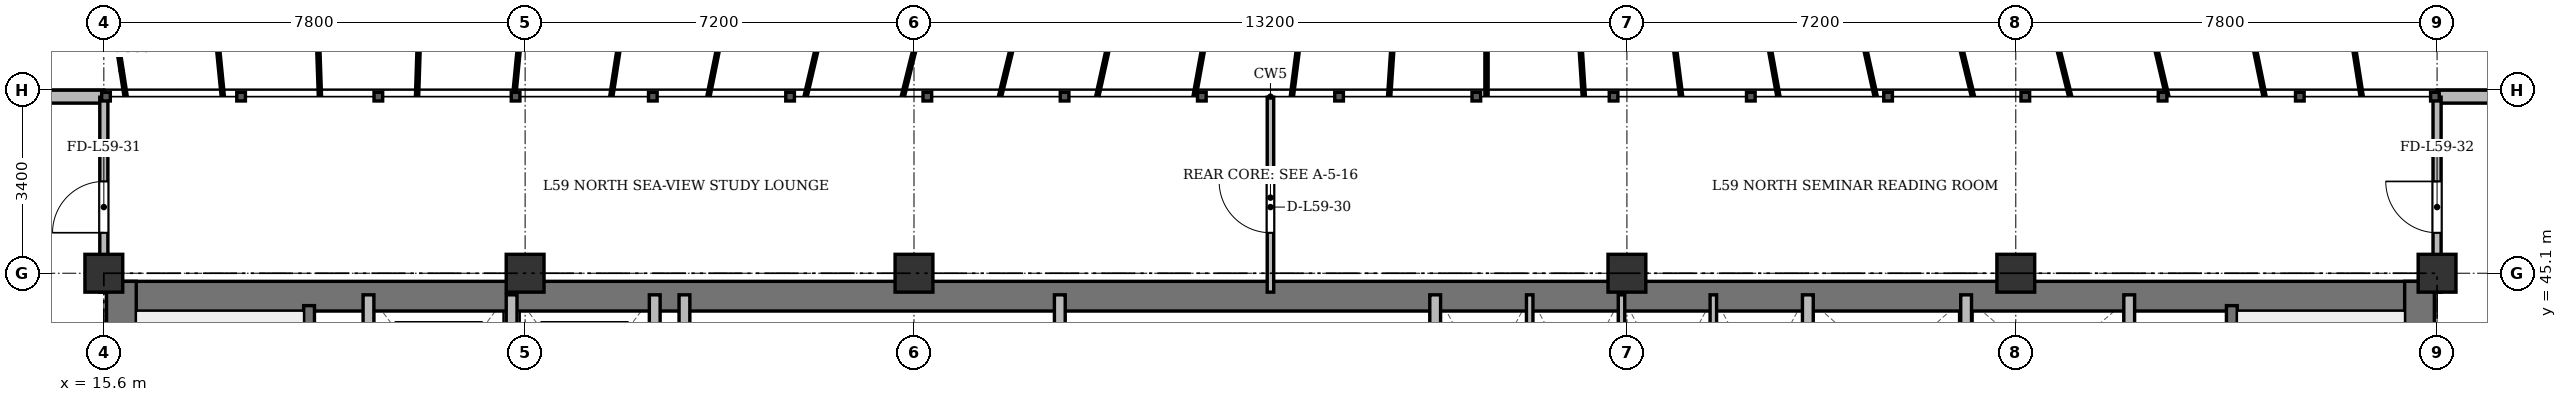
"""IFC4 building model, lengths in metres.
Left out: names, types, materials, properties, quantities, classifications, styles, units other than length and angle.
Written with IfcOpenShell. Run it as: python <this file> out.ifc"""

import sys

from ifc_helpers import new_model, si_unit, direction, frame, frame_2d, origin, origin_2d, place, context, subcontext, project, spatial, rectangle, extrude, source, transform, mapped, element, fill, save


model = new_model("IFC4")
c1 = context("Model", 3, precision=1e-05, world=origin(), true_north=direction((0.0, 1.0)))
c2 = subcontext(c1, "Body", "Model", "MODEL_VIEW")
j1 = project(units=[si_unit("LENGTHUNIT", "METRE"), si_unit("PLANEANGLEUNIT", "RADIAN")], contexts=[c1])
p1 = place(None, origin())
s1 = spatial("IfcSite", under=j1, at=p1, CompositionType="ELEMENT")
p2 = place(p1, origin())
s2 = spatial("IfcBuilding", under=s1, at=p2, CompositionType="ELEMENT")
p3 = place(p2, frame((0.0, 0.0, 226.5)))
s3 = spatial("IfcBuildingStorey", under=s2, at=p3, CompositionType="ELEMENT", Elevation=226.5)
m1 = source(origin(), c2, "Body", "SweptSolid", [
    extrude(rectangle(XDim=0.7, YDim=0.7, at=origin_2d()), origin(), (0.0, 0.0, 1.0), 3.6),
])
for number, where, z_axis, x_axis in (
    (1, (15.6, 45.1, 0.0), (0.0, 0.0, 1.0), (1.0, 0.0, 0.0)),
    (2, (23.4, 45.1, 0.0), (0.0, 0.0, 1.0), (1.0, 0.0, 0.0)),
    (3, (30.6, 45.1, 0.0), (0.0, 0.0, 1.0), (1.0, 0.0, 0.0)),
    (4, (43.8, 45.1, 0.0), (0.0, 0.0, 1.0), (1.0, 0.0, 0.0)),
    (5, (51.0, 45.1, 0.0), (0.0, 0.0, 1.0), (1.0, 0.0, 0.0)),
    (6, (58.8, 45.1, 0.0), (0.0, 0.0, 1.0), (1.0, 0.0, 0.0)),
):
    element("IfcColumn", number, at=place(p3, frame(where, z_axis=z_axis, x_axis=x_axis)), inside=s3, PredefinedType="COLUMN", context=c2, shape_type="MappedRepresentation", body=[
        mapped(m1, transform((0.0, 0.0, 0.0), x_axis=(1.0, 0.0, 0.0), y_axis=(0.0, 1.0, 0.0), z_axis=(0.0, 0.0, 1.0), scale=1.0)),
    ])
p4 = place(p3, frame((11.1, 48.37, 0.0), z_axis=(0.0, 0.0, 1.0), x_axis=(1.0, 0.0, 0.0)))
e7 = element("IfcWall", 7, at=p4, inside=s3, PredefinedType="SOLIDWALL", context=c2, shape_type="SweptSolid", body=[
    extrude(rectangle(XDim=4.5, YDim=0.24, at=frame_2d((2.25, 0.0))), origin(), (0.0, 0.0, 1.0), 3.36),
])
p5 = place(p4, frame((2.003, 0.0, 0.9)))
e8 = element("IfcOpeningElement", 8, at=p5, cuts=e7, PredefinedType="OPENING", context=c2, shape_type="SweptSolid", body=[
    extrude(rectangle(XDim=1.35, YDim=1.5, at=frame_2d((0.675, 0.75))), frame((0.0, 0.13, 0.0), z_axis=(0.0, -1.0, 0.0), x_axis=(1.0, 0.0, 0.0)), (0.0, 0.0, 1.0), 0.26),
])
p6 = place(p3, frame((58.8, 48.37, 0.0), z_axis=(0.0, 0.0, 1.0), x_axis=(1.0, 0.0, 0.0)))
e9 = element("IfcWall", 9, at=p6, inside=s3, PredefinedType="SOLIDWALL", context=c2, shape_type="SweptSolid", body=[
    extrude(rectangle(XDim=4.5, YDim=0.24, at=frame_2d((2.25, 0.0))), origin(), (0.0, 0.0, 1.0), 3.36),
])
p7 = place(p6, frame((1.147, 0.0, 0.9)))
e10 = element("IfcOpeningElement", 10, at=p7, cuts=e9, PredefinedType="OPENING", context=c2, shape_type="SweptSolid", body=[
    extrude(rectangle(XDim=1.35, YDim=1.5, at=frame_2d((0.675, 0.75))), frame((0.0, 0.13, 0.0), z_axis=(0.0, -1.0, 0.0), x_axis=(1.0, 0.0, 0.0)), (0.0, 0.0, 1.0), 0.26),
])
p8 = place(p3, frame((15.65, 44.675, 0.0), z_axis=(0.0, 0.0, 1.0), x_axis=(1.0, 0.0, 0.0)))
e11 = element("IfcWall", 11, at=p8, inside=s3, PredefinedType="SHEAR", context=c2, shape_type="SweptSolid", body=[
    extrude(rectangle(XDim=43.1, YDim=0.55, at=frame_2d((21.55, 0.0))), origin(), (0.0, 0.0, 1.0), 3.36),
])
for number, where, z_axis, x_axis in (
    (12, (15.925, 33.4, 0.0), (0.0, 0.0, 1.0), (0.0, 1.0, 0.0)),
    (13, (58.475, 33.4, 0.0), (0.0, 0.0, 1.0), (0.0, 1.0, 0.0)),
):
    element("IfcWall", number, at=place(p3, frame(where, z_axis=z_axis, x_axis=x_axis)), inside=s3, PredefinedType="SHEAR", context=c2, shape_type="SweptSolid", body=[
        extrude(rectangle(XDim=11.55, YDim=0.55, at=frame_2d((5.775, 0.0))), origin(), (0.0, 0.0, 1.0), 3.36),
    ])
p9 = place(p3, frame((19.4, 33.4, 0.0), z_axis=(0.0, 0.0, 1.0), x_axis=(0.0, 1.0, 0.0)))
e14 = element("IfcWall", 14, at=p9, inside=s3, PredefinedType="SHEAR", context=c2, shape_type="SweptSolid", body=[
    extrude(rectangle(XDim=11.1, YDim=0.2, at=frame_2d((5.55, 0.0))), origin(), (0.0, 0.0, 1.0), 3.36),
])
p10 = place(p9, frame((0.85, 0.0, 0.0)))
e15 = element("IfcOpeningElement", 15, at=p10, cuts=e14, PredefinedType="OPENING", context=c2, shape_type="SweptSolid", body=[
    extrude(rectangle(XDim=1.1, YDim=2.15, at=frame_2d((0.55, 1.075))), frame((0.0, 0.11, 0.0), z_axis=(0.0, -1.0, 0.0), x_axis=(1.0, 0.0, 0.0)), (0.0, 0.0, 1.0), 0.22),
])
p11 = place(p3, frame((55.0, 33.4, 0.0), z_axis=(0.0, 0.0, 1.0), x_axis=(0.0, 1.0, 0.0)))
e16 = element("IfcWall", 16, at=p11, inside=s3, PredefinedType="SHEAR", context=c2, shape_type="SweptSolid", body=[
    extrude(rectangle(XDim=11.1, YDim=0.2, at=frame_2d((5.55, 0.0))), origin(), (0.0, 0.0, 1.0), 3.36),
])
p12 = place(p11, frame((0.85, 0.0, 0.0)))
e17 = element("IfcOpeningElement", 17, at=p12, cuts=e16, PredefinedType="OPENING", context=c2, shape_type="SweptSolid", body=[
    extrude(rectangle(XDim=1.1, YDim=2.15, at=frame_2d((0.55, 1.075))), frame((0.0, 0.11, 0.0), z_axis=(0.0, -1.0, 0.0), x_axis=(1.0, 0.0, 0.0)), (0.0, 0.0, 1.0), 0.22),
])
for number, where, z_axis, x_axis in (
    (18, (20.5, 41.3, 0.0), (0.0, 0.0, 1.0), (0.0, 1.0, 0.0)),
    (19, (23.15, 41.3, 0.0), (0.0, 0.0, 1.0), (0.0, 1.0, 0.0)),
    (20, (25.8, 41.3, 0.0), (0.0, 0.0, 1.0), (0.0, 1.0, 0.0)),
):
    element("IfcWall", number, at=place(p3, frame(where, z_axis=z_axis, x_axis=x_axis)), inside=s3, PredefinedType="SOLIDWALL", context=c2, shape_type="SweptSolid", body=[
        extrude(rectangle(XDim=3.4, YDim=0.2, at=frame_2d((1.7, 0.0))), origin(), (0.0, 0.0, 1.0), 3.36),
    ])
for number, where, z_axis, x_axis in (
    (21, (26.35, 33.4, 0.0), (0.0, 0.0, 1.0), (0.0, 1.0, 0.0)),
    (22, (33.3, 33.4, 0.0), (0.0, 0.0, 1.0), (0.0, 1.0, 0.0)),
):
    element("IfcWall", number, at=place(p3, frame(where, z_axis=z_axis, x_axis=x_axis)), inside=s3, PredefinedType="SOLIDWALL", context=c2, shape_type="SweptSolid", body=[
        extrude(rectangle(XDim=11.3, YDim=0.2, at=frame_2d((5.65, 0.0))), origin(), (0.0, 0.0, 1.0), 2.91),
    ])
p13 = place(p3, frame((40.25, 41.5, 0.0), z_axis=(0.0, 0.0, 1.0), x_axis=(0.0, 1.0, 0.0)))
e23 = element("IfcWall", 23, at=p13, inside=s3, PredefinedType="SOLIDWALL", context=c2, shape_type="SweptSolid", body=[
    extrude(rectangle(XDim=3.2, YDim=0.2, at=frame_2d((1.6, 0.0))), origin(), (0.0, 0.0, 1.0), 3.36),
])
for number, where, z_axis, x_axis in (
    (24, (42.0, 41.5, 0.0), (0.0, 0.0, 1.0), (0.0, 1.0, 0.0)),
    (25, (43.7, 41.5, 0.0), (0.0, 0.0, 1.0), (0.0, 1.0, 0.0)),
    (26, (45.4, 41.5, 0.0), (0.0, 0.0, 1.0), (0.0, 1.0, 0.0)),
):
    element("IfcWall", number, at=place(p3, frame(where, z_axis=z_axis, x_axis=x_axis)), inside=s3, PredefinedType="PARTITIONING", context=c2, shape_type="SweptSolid", body=[
        extrude(rectangle(XDim=3.2, YDim=0.12, at=frame_2d((1.6, 0.0))), origin(), (0.0, 0.0, 1.0), 3.36),
    ])
p14 = place(p3, frame((47.15, 33.4, 0.0), z_axis=(0.0, 0.0, 1.0), x_axis=(0.0, 1.0, 0.0)))
e27 = element("IfcWall", 27, at=p14, inside=s3, PredefinedType="SOLIDWALL", context=c2, shape_type="SweptSolid", body=[
    extrude(rectangle(XDim=11.3, YDim=0.2, at=frame_2d((5.65, 0.0))), origin(), (0.0, 0.0, 1.0), 2.91),
])
for number, where, z_axis, x_axis in (
    (28, (50.08, 42.05, 0.0), (0.0, 0.0, 1.0), (0.0, 1.0, 0.0)),
    (29, (53.1, 42.05, 0.0), (0.0, 0.0, 1.0), (0.0, 1.0, 0.0)),
):
    element("IfcWall", number, at=place(p3, frame(where, z_axis=z_axis, x_axis=x_axis)), inside=s3, PredefinedType="SOLIDWALL", context=c2, shape_type="SweptSolid", body=[
        extrude(rectangle(XDim=2.65, YDim=0.2, at=frame_2d((1.325, 0.0))), origin(), (0.0, 0.0, 1.0), 3.36),
    ])
p15 = place(p3, frame((37.2, 44.75, 0.0), z_axis=(0.0, 0.0, 1.0), x_axis=(0.0, 1.0, 0.0)))
e30 = element("IfcWall", 30, at=p15, inside=s3, PredefinedType="PARTITIONING", context=c2, shape_type="SweptSolid", body=[
    extrude(rectangle(XDim=3.61, YDim=0.12, at=frame_2d((1.805, 0.0))), origin(), (0.0, 0.0, 1.0), 2.91),
])
p16 = place(p15, frame((1.1, 0.0, 0.0)))
e31 = element("IfcOpeningElement", 31, at=p16, cuts=e30, PredefinedType="OPENING", context=c2, shape_type="SweptSolid", body=[
    extrude(rectangle(XDim=0.95, YDim=2.15, at=frame_2d((0.475, 1.075))), frame((0.0, 0.07, 0.0), z_axis=(0.0, -1.0, 0.0), x_axis=(1.0, 0.0, 0.0)), (0.0, 0.0, 1.0), 0.14),
])
p17 = place(p3, frame((15.6, 44.75, 0.0), z_axis=(0.0, 0.0, 1.0), x_axis=(0.0, 1.0, 0.0)))
e32 = element("IfcWall", 32, at=p17, inside=s3, PredefinedType="PARTITIONING", context=c2, shape_type="SweptSolid", body=[
    extrude(rectangle(XDim=3.61, YDim=0.15, at=frame_2d((1.805, 0.0))), origin(), (0.0, 0.0, 1.0), 2.86),
])
p18 = place(p17, frame((1.1, 0.0, 0.0)))
e33 = element("IfcOpeningElement", 33, at=p18, cuts=e32, PredefinedType="OPENING", context=c2, shape_type="SweptSolid", body=[
    extrude(rectangle(XDim=0.95, YDim=2.15, at=frame_2d((0.475, 1.075))), frame((0.0, 0.085, 0.0), z_axis=(0.0, -1.0, 0.0), x_axis=(1.0, 0.0, 0.0)), (0.0, 0.0, 1.0), 0.17),
])
p19 = place(p3, frame((58.8, 44.75, 0.0), z_axis=(0.0, 0.0, 1.0), x_axis=(0.0, 1.0, 0.0)))
e34 = element("IfcWall", 34, at=p19, inside=s3, PredefinedType="PARTITIONING", context=c2, shape_type="SweptSolid", body=[
    extrude(rectangle(XDim=3.61, YDim=0.15, at=frame_2d((1.805, 0.0))), origin(), (0.0, 0.0, 1.0), 2.86),
])
p20 = place(p19, frame((1.1, 0.0, 0.0)))
e35 = element("IfcOpeningElement", 35, at=p20, cuts=e34, PredefinedType="OPENING", context=c2, shape_type="SweptSolid", body=[
    extrude(rectangle(XDim=0.95, YDim=2.15, at=frame_2d((0.475, 1.075))), frame((0.0, 0.085, 0.0), z_axis=(0.0, -1.0, 0.0), x_axis=(1.0, 0.0, 0.0)), (0.0, 0.0, 1.0), 0.17),
])
m2 = source(origin(), c2, "Body", "SweptSolid", [
    extrude(rectangle(XDim=0.95, YDim=2.15, at=frame_2d((0.475, 1.075))), frame((0.0, 0.025, 0.0), z_axis=(0.0, -1.0, 0.0), x_axis=(1.0, 0.0, 0.0)), (0.0, 0.0, 1.0), 0.05),
])
p21 = place(p16, origin())
e36 = element("IfcDoor", 36, at=p21, inside=s3, OperationType="SINGLE_SWING_RIGHT", PredefinedType="DOOR", context=c2, shape_type="MappedRepresentation", body=[
    mapped(m2, transform((0.0, 0.0, 0.0), x_axis=(1.0, 0.0, 0.0), y_axis=(0.0, 1.0, 0.0), z_axis=(0.0, 0.0, 1.0), scale=1.0)),
])
fill(e31, e36)
p22 = place(p18, origin())
e37 = element("IfcDoor", 37, at=p22, inside=s3, OperationType="SINGLE_SWING_LEFT", PredefinedType="DOOR", context=c2, shape_type="MappedRepresentation", body=[
    mapped(m2, transform((0.0, 0.0, 0.0), x_axis=(1.0, 0.0, 0.0), y_axis=(0.0, 1.0, 0.0), z_axis=(0.0, 0.0, 1.0), scale=1.0)),
])
fill(e33, e37)
p23 = place(p20, origin())
e38 = element("IfcDoor", 38, at=p23, inside=s3, OperationType="SINGLE_SWING_RIGHT", PredefinedType="DOOR", context=c2, shape_type="MappedRepresentation", body=[
    mapped(m2, transform((0.0, 0.0, 0.0), x_axis=(1.0, 0.0, 0.0), y_axis=(0.0, 1.0, 0.0), z_axis=(0.0, 0.0, 1.0), scale=1.0)),
])
fill(e35, e38)
save(model, sys.argv[1])
